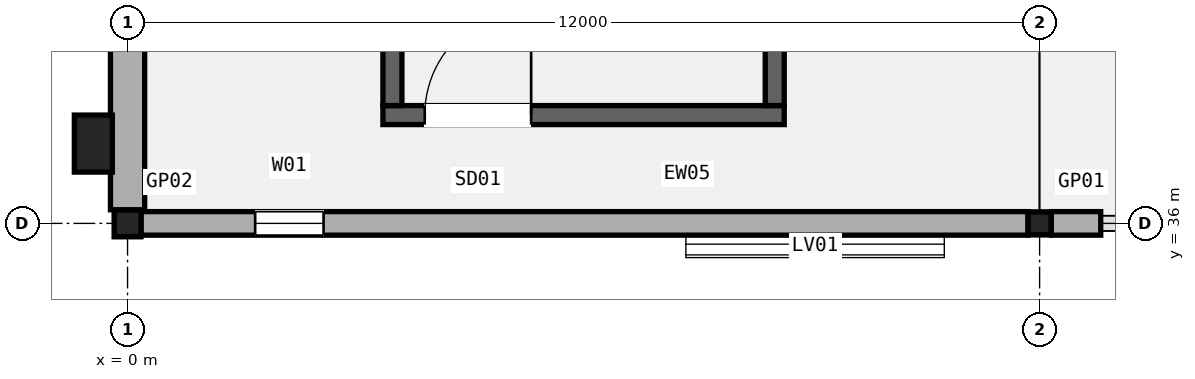
"""IFC4 building model, lengths in metres.
Left out: names, types, materials, properties, quantities, classifications, styles, units other than length and angle.
Written with IfcOpenShell. Run it as: python <this file> out.ifc"""

import sys

from ifc_helpers import new_model, si_unit, direction, frame, frame_2d, origin, origin_2d, place, context, subcontext, project, spatial, rectangle, hollow_rectangle, extrude, element, fill, save


model = new_model("IFC4")
c1 = context("Model", 3, precision=1e-05, world=origin(), true_north=direction((0.0, 1.0)))
c2 = subcontext(c1, "Body", "Model", "MODEL_VIEW")
j1 = project(units=[si_unit("LENGTHUNIT", "METRE"), si_unit("PLANEANGLEUNIT", "RADIAN")], contexts=[c1])
p1 = place(None, origin())
s1 = spatial("IfcSite", under=j1, at=p1, CompositionType="ELEMENT")
p2 = place(p1, origin())
s2 = spatial("IfcBuilding", under=s1, at=p2, CompositionType="ELEMENT")
p3 = place(p2, frame((0.0, 0.0, 20.4)))
s3 = spatial("IfcBuildingStorey", under=s2, at=p3, CompositionType="ELEMENT", Elevation=20.4)
p4 = place(p3, frame((0.0, 36.0, 0.0), z_axis=(0.0, 0.0, 1.0), x_axis=(1.0, 0.0, 0.0)))
e1 = element("IfcColumn", 1, at=p4, inside=s3, PredefinedType="COLUMN", context=c2, shape_type="SweptSolid", body=[
    extrude(hollow_rectangle(XDim=0.35, YDim=0.35, WallThickness=0.016, InnerFilletRadius=0.016, OuterFilletRadius=0.032, at=origin_2d()), origin(), (0.0, 0.0, 1.0), 5.4),
])
p5 = place(p3, frame((12.0, 36.0, 0.0), z_axis=(0.0, 0.0, 1.0), x_axis=(1.0, 0.0, 0.0)))
e2 = element("IfcColumn", 2, at=p5, inside=s3, PredefinedType="COLUMN", context=c2, shape_type="SweptSolid", body=[
    extrude(hollow_rectangle(XDim=0.3, YDim=0.3, WallThickness=0.012, InnerFilletRadius=0.012, OuterFilletRadius=0.024, at=origin_2d()), origin(), (0.0, 0.0, 1.0), 5.4),
])
p6 = place(p3, frame((-0.45, 37.05, 0.0), z_axis=(0.0, 0.0, 1.0), x_axis=(1.0, 0.0, 0.0)))
e3 = element("IfcColumn", 3, at=p6, inside=s3, PredefinedType="PILASTER", context=c2, shape_type="SweptSolid", body=[
    extrude(rectangle(XDim=0.5, YDim=0.75, at=origin_2d()), origin(), (0.0, 0.0, 1.0), 5.4),
])
p7 = place(p3, frame((0.179, 36.0, 0.0), z_axis=(0.0, 0.0, 1.0), x_axis=(1.0, 0.0, 0.0)))
e4 = element("IfcWall", 4, at=p7, inside=s3, PredefinedType="SOLIDWALL", context=c2, shape_type="SweptSolid", body=[
    extrude(rectangle(XDim=11.667, YDim=0.31, at=frame_2d((5.833, 0.0))), origin(), (0.0, 0.0, 1.0), 4.48),
])
p8 = place(p7, frame((1.5, 0.0, 0.95)))
e5 = element("IfcOpeningElement", 5, at=p8, cuts=e4, PredefinedType="OPENING", context=c2, shape_type="SweptSolid", body=[
    extrude(rectangle(XDim=0.9, YDim=2.1, at=frame_2d((0.45, 1.05))), frame((0.0, 0.165, 0.0), z_axis=(0.0, -1.0, 0.0), x_axis=(1.0, 0.0, 0.0)), (0.0, 0.0, 1.0), 0.33),
])
p9 = place(p3, frame((0.0, 36.179, 0.0), z_axis=(0.0, 0.0, 1.0), x_axis=(0.0, 1.0, 0.0)))
e6 = element("IfcWall", 6, at=p9, inside=s3, PredefinedType="SOLIDWALL", context=c2, shape_type="SweptSolid", body=[
    extrude(rectangle(XDim=11.667, YDim=0.45, at=frame_2d((5.833, 0.0))), origin(), (0.0, 0.0, 1.0), 4.48),
])
p10 = place(p9, frame((2.75, 0.0, 0.95)))
e7 = element("IfcOpeningElement", 7, at=p10, cuts=e6, PredefinedType="OPENING", context=c2, shape_type="SweptSolid", body=[
    extrude(rectangle(XDim=0.9, YDim=2.4, at=frame_2d((0.45, 1.2))), frame((0.0, 0.235, 0.0), z_axis=(0.0, -1.0, 0.0), x_axis=(1.0, 0.0, 0.0)), (0.0, 0.0, 1.0), 0.47),
])
p11 = place(p3, frame((12.154, 36.0, 0.0), z_axis=(0.0, 0.0, 1.0), x_axis=(1.0, 0.0, 0.0)))
e8 = element("IfcWall", 8, at=p11, inside=s3, PredefinedType="SOLIDWALL", context=c2, shape_type="SweptSolid", body=[
    extrude(rectangle(XDim=0.65, YDim=0.31, at=frame_2d((0.325, 0.0))), origin(), (0.0, 0.0, 1.0), 4.58),
])
p12 = place(p3, frame((3.36, 37.425, 0.0), z_axis=(0.0, 0.0, 1.0), x_axis=(1.0, 0.0, 0.0)))
e9 = element("IfcWall", 9, at=p12, inside=s3, PredefinedType="SHEAR", context=c2, shape_type="SweptSolid", body=[
    extrude(rectangle(XDim=5.28, YDim=0.25, at=frame_2d((2.64, 0.0))), origin(), (0.0, 0.0, 1.0), 5.18),
])
p13 = place(p12, frame((0.55, 0.0, 0.0)))
e10 = element("IfcOpeningElement", 10, at=p13, cuts=e9, PredefinedType="OPENING", context=c2, shape_type="SweptSolid", body=[
    extrude(rectangle(XDim=1.4, YDim=2.15, at=frame_2d((0.7, 1.075))), frame((0.0, 0.135, 0.0), z_axis=(0.0, -1.0, 0.0), x_axis=(1.0, 0.0, 0.0)), (0.0, 0.0, 1.0), 0.27),
])
for number, where, z_axis, x_axis in (
    (11, (3.485, 37.55, 0.0), (0.0, 0.0, 1.0), (0.0, 1.0, 0.0)),
    (12, (8.515, 37.55, 0.0), (0.0, 0.0, 1.0), (0.0, 1.0, 0.0)),
):
    element("IfcWall", number, at=place(p3, frame(where, z_axis=z_axis, x_axis=x_axis)), inside=s3, PredefinedType="SHEAR", context=c2, shape_type="SweptSolid", body=[
        extrude(rectangle(XDim=8.9, YDim=0.25, at=frame_2d((4.45, 0.0))), origin(), (0.0, 0.0, 1.0), 5.18),
    ])
p14 = place(p8, origin())
e13 = element("IfcWindow", 13, at=p14, inside=s3, PartitioningType="SINGLE_PANEL", PredefinedType="WINDOW", context=c2, shape_type="SweptSolid", body=[
    extrude(rectangle(XDim=0.9, YDim=2.1, at=frame_2d((0.45, 1.05))), frame((0.0, 0.03, 0.0), z_axis=(0.0, -1.0, 0.0), x_axis=(1.0, 0.0, 0.0)), (0.0, 0.0, 1.0), 0.06),
])
fill(e5, e13)
p15 = place(p13, origin())
e14 = element("IfcDoor", 14, at=p15, inside=s3, OperationType="SINGLE_SWING_RIGHT", PredefinedType="DOOR", context=c2, shape_type="SweptSolid", body=[
    extrude(rectangle(XDim=1.4, YDim=2.15, at=frame_2d((0.7, 1.075))), frame((0.0, 0.025, 0.0), z_axis=(0.0, -1.0, 0.0), x_axis=(1.0, 0.0, 0.0)), (0.0, 0.0, 1.0), 0.05),
])
fill(e10, e14)
save(model, sys.argv[1])
